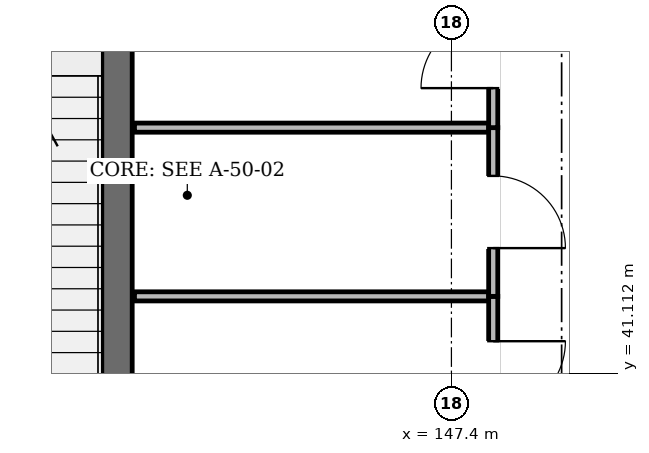
"""IFC4 building model, lengths in metres.
Left out: names, types, materials, properties, quantities, classifications, styles, units other than length and angle.
Written with IfcOpenShell. Run it as: python <this file> out.ifc"""

import sys

from ifc_helpers import new_model, si_unit, direction, frame, frame_2d, origin, place, context, subcontext, project, spatial, rectangle, extrude, element, fill, save


model = new_model("IFC4")
c1 = context("Model", 3, precision=1e-05, world=origin(), true_north=direction((0.0, 1.0)))
c2 = subcontext(c1, "Body", "Model", "MODEL_VIEW")
j1 = project(units=[si_unit("LENGTHUNIT", "METRE"), si_unit("PLANEANGLEUNIT", "RADIAN")], contexts=[c1])
p1 = place(None, origin())
s1 = spatial("IfcSite", under=j1, at=p1, CompositionType="ELEMENT")
p2 = place(p1, origin())
s2 = spatial("IfcBuilding", under=s1, at=p2, CompositionType="ELEMENT")
p3 = place(p2, origin())
s3 = spatial("IfcBuildingStorey", under=s2, at=p3, CompositionType="ELEMENT", Elevation=0.0)
p4 = place(p3, frame((143.0, 39.7, 0.0), z_axis=(0.0, 0.0, 1.0), x_axis=(0.0, 1.0, 0.0)))
e1 = element("IfcWall", 1, at=p4, inside=s3, PredefinedType="SHEAR", context=c2, shape_type="SweptSolid", body=[
    extrude(rectangle(XDim=7.0, YDim=0.4, at=frame_2d((3.5, 0.0))), origin(), (0.0, 0.0, 1.0), 5.1),
])
p5 = place(p3, frame((143.23, 42.12, 0.0), z_axis=(0.0, 0.0, 1.0), x_axis=(1.0, 0.0, 0.0)))
e2 = element("IfcWall", 2, at=p5, inside=s3, PredefinedType="PARTITIONING", context=c2, shape_type="SweptSolid", body=[
    extrude(rectangle(XDim=4.72, YDim=0.12, at=frame_2d((2.36, 0.0))), origin(), (0.0, 0.0, 1.0), 4.575),
])
p6 = place(p3, frame((147.95, 42.12, 0.0), z_axis=(0.0, 0.0, 1.0), x_axis=(0.0, -1.0, 0.0)))
e3 = element("IfcWall", 3, at=p6, inside=s3, PredefinedType="PARTITIONING", context=c2, shape_type="SweptSolid", body=[
    extrude(rectangle(XDim=2.13, YDim=0.12, at=frame_2d((1.065, 0.0))), origin(), (0.0, 0.0, 1.0), 5.005),
])
p7 = place(p6, frame((0.59, 0.0, 0.0)))
e4 = element("IfcOpeningElement", 4, at=p7, cuts=e3, PredefinedType="OPENING", context=c2, shape_type="SweptSolid", body=[
    extrude(rectangle(XDim=0.95, YDim=2.15, at=frame_2d((0.475, 1.075))), frame((0.0, 0.072, 0.0), z_axis=(0.0, -1.0, 0.0), x_axis=(1.0, 0.0, 0.0)), (0.0, 0.0, 1.0), 0.144),
])
p8 = place(p3, frame((143.23, 44.34, 0.0), z_axis=(0.0, 0.0, 1.0), x_axis=(1.0, 0.0, 0.0)))
e5 = element("IfcWall", 5, at=p8, inside=s3, PredefinedType="PARTITIONING", context=c2, shape_type="SweptSolid", body=[
    extrude(rectangle(XDim=4.72, YDim=0.12, at=frame_2d((2.36, 0.0))), origin(), (0.0, 0.0, 1.0), 4.525),
])
p9 = place(p3, frame((147.95, 44.34, 0.0), z_axis=(0.0, 0.0, 1.0), x_axis=(0.0, -1.0, 0.0)))
e6 = element("IfcWall", 6, at=p9, inside=s3, PredefinedType="PARTITIONING", context=c2, shape_type="SweptSolid", body=[
    extrude(rectangle(XDim=2.22, YDim=0.12, at=frame_2d((1.11, 0.0))), origin(), (0.0, 0.0, 1.0), 5.005),
])
p10 = place(p9, frame((0.635, 0.0, 0.0)))
e7 = element("IfcOpeningElement", 7, at=p10, cuts=e6, PredefinedType="OPENING", context=c2, shape_type="SweptSolid", body=[
    extrude(rectangle(XDim=0.95, YDim=2.15, at=frame_2d((0.475, 1.075))), frame((0.0, 0.072, 0.0), z_axis=(0.0, -1.0, 0.0), x_axis=(1.0, 0.0, 0.0)), (0.0, 0.0, 1.0), 0.144),
])
p11 = place(p3, frame((147.95, 46.33, 0.0), z_axis=(0.0, 0.0, 1.0), x_axis=(0.0, -1.0, 0.0)))
e8 = element("IfcWall", 8, at=p11, inside=s3, PredefinedType="PARTITIONING", context=c2, shape_type="SweptSolid", body=[
    extrude(rectangle(XDim=1.99, YDim=0.12, at=frame_2d((0.995, 0.0))), origin(), (0.0, 0.0, 1.0), 5.005),
])
p12 = place(p11, frame((0.52, 0.0, 0.0)))
e9 = element("IfcOpeningElement", 9, at=p12, cuts=e8, PredefinedType="OPENING", context=c2, shape_type="SweptSolid", body=[
    extrude(rectangle(XDim=0.95, YDim=2.15, at=frame_2d((0.475, 1.075))), frame((0.0, 0.072, 0.0), z_axis=(0.0, -1.0, 0.0), x_axis=(1.0, 0.0, 0.0)), (0.0, 0.0, 1.0), 0.144),
])
p13 = place(p7, origin())
e10 = element("IfcDoor", 10, at=p13, inside=s3, OperationType="SINGLE_SWING_LEFT", PredefinedType="DOOR", context=c2, shape_type="SweptSolid", body=[
    extrude(rectangle(XDim=0.95, YDim=2.15, at=frame_2d((0.475, 1.075))), frame((0.0, 0.025, 0.0), z_axis=(0.0, -1.0, 0.0), x_axis=(1.0, 0.0, 0.0)), (0.0, 0.0, 1.0), 0.05),
])
fill(e4, e10)
p14 = place(p10, origin())
e11 = element("IfcDoor", 11, at=p14, inside=s3, OperationType="SINGLE_SWING_RIGHT", PredefinedType="DOOR", context=c2, shape_type="SweptSolid", body=[
    extrude(rectangle(XDim=0.95, YDim=2.15, at=frame_2d((0.475, 1.075))), frame((0.0, 0.025, 0.0), z_axis=(0.0, -1.0, 0.0), x_axis=(1.0, 0.0, 0.0)), (0.0, 0.0, 1.0), 0.05),
])
fill(e7, e11)
p15 = place(p12, frame((0.95, 0.0, 0.0), z_axis=(0.0, 0.0, 1.0), x_axis=(-1.0, 0.0, 0.0)))
e12 = element("IfcDoor", 12, at=p15, inside=s3, OperationType="SINGLE_SWING_LEFT", PredefinedType="DOOR", context=c2, shape_type="SweptSolid", body=[
    extrude(rectangle(XDim=0.95, YDim=2.15, at=frame_2d((0.475, 1.075))), frame((0.0, 0.025, 0.0), z_axis=(0.0, -1.0, 0.0), x_axis=(1.0, 0.0, 0.0)), (0.0, 0.0, 1.0), 0.05),
])
fill(e9, e12)
save(model, sys.argv[1])
